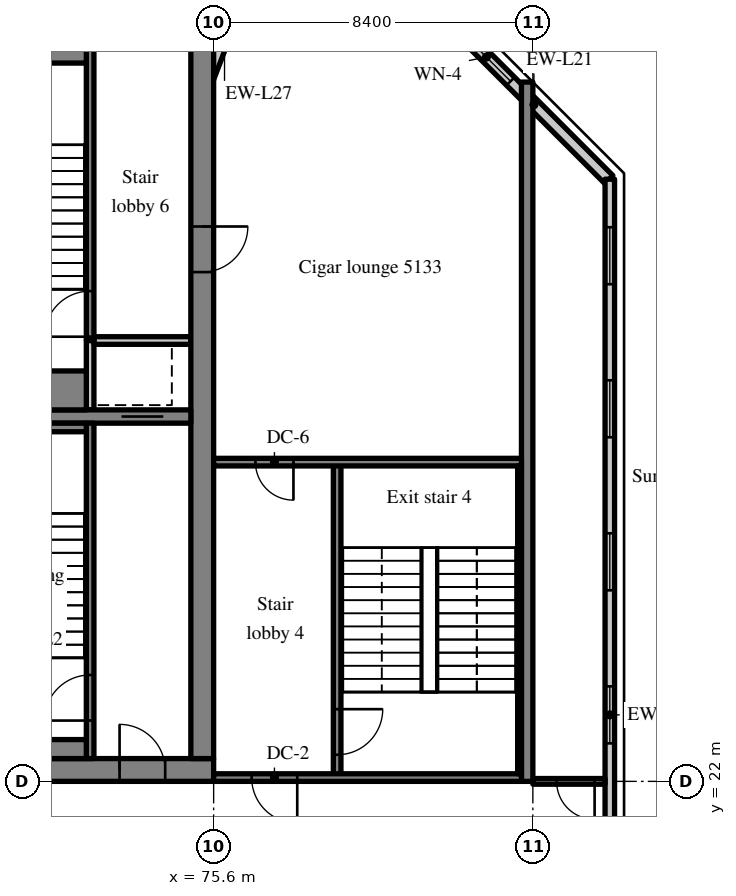
"""IFC4 building model, lengths in metres.
Left out: names, types, materials, properties, quantities, classifications, styles, units other than length and angle.
Written with IfcOpenShell. Run it as: python <this file> out.ifc"""

import sys

from ifc_helpers import new_model, si_unit, direction, frame, frame_2d, origin, place, context, subcontext, project, spatial, rectangle, extrude, source, transform, mapped, element, fill, save


model = new_model("IFC4")
c1 = context("Model", 3, precision=1e-05, world=origin(), true_north=direction((0.0, 1.0)))
c2 = subcontext(c1, "Body", "Model", "MODEL_VIEW")
j1 = project(units=[si_unit("LENGTHUNIT", "METRE"), si_unit("PLANEANGLEUNIT", "RADIAN")], contexts=[c1])
p1 = place(None, origin())
s1 = spatial("IfcSite", under=j1, at=p1, CompositionType="ELEMENT")
p2 = place(p1, origin())
s2 = spatial("IfcBuilding", under=s1, at=p2, CompositionType="ELEMENT")
p3 = place(p2, frame((0.0, 0.0, 214.0)))
s3 = spatial("IfcBuildingStorey", under=s2, at=p3, CompositionType="ELEMENT", Elevation=214.0)
m1 = source(origin(), c2, "Body", "SweptSolid", [
    extrude(rectangle(XDim=50.4, YDim=0.6, at=frame_2d((25.2, 0.0))), origin(), (0.0, 0.0, 1.0), 3.62),
])
p4 = place(p3, frame((25.2, 22.3, 0.0), z_axis=(0.0, 0.0, 1.0), x_axis=(1.0, 0.0, 0.0)))
e1 = element("IfcWall", 1, at=p4, inside=s3, PredefinedType="SHEAR", context=c2, shape_type="MappedRepresentation", body=[
    mapped(m1, transform((0.0, 0.0, 0.0), scale=1.0)),
])
m2 = source(origin(), c2, "Body", "SweptSolid", [
    extrude(rectangle(XDim=1.8, YDim=2.1, at=frame_2d((0.9, 1.05))), frame((0.0, 0.31, 0.0), z_axis=(0.0, -1.0, 0.0), x_axis=(1.0, 0.0, 0.0)), (0.0, 0.0, 1.0), 0.62),
])
p5 = place(p4, frame((15.9, 0.0, 0.0)))
e2 = element("IfcOpeningElement", 2, at=p5, cuts=e1, PredefinedType="OPENING", context=c2, shape_type="MappedRepresentation", body=[
    mapped(m2, transform((0.0, 0.0, 0.0), scale=1.0)),
])
m3 = source(origin(), c2, "Body", "SweptSolid", [
    extrude(rectangle(XDim=0.9, YDim=2.1, at=frame_2d((0.45, 1.05))), frame((0.0, 0.31, 0.0), z_axis=(0.0, -1.0, 0.0), x_axis=(1.0, 0.0, 0.0)), (0.0, 0.0, 1.0), 0.62),
])
p6 = place(p4, frame((9.687, 0.0, 0.0)))
e3 = element("IfcOpeningElement", 3, at=p6, cuts=e1, PredefinedType="OPENING", context=c2, shape_type="MappedRepresentation", body=[
    mapped(m3, transform((0.0, 0.0, 0.0), scale=1.0)),
])
p7 = place(p4, frame((21.513, 0.0, 0.0)))
e4 = element("IfcOpeningElement", 4, at=p7, cuts=e1, PredefinedType="OPENING", context=c2, shape_type="MappedRepresentation", body=[
    mapped(m3, transform((0.0, 0.0, 0.0), scale=1.0)),
])
p8 = place(p4, frame((32.7, 0.0, 0.0)))
e5 = element("IfcOpeningElement", 5, at=p8, cuts=e1, PredefinedType="OPENING", context=c2, shape_type="MappedRepresentation", body=[
    mapped(m2, transform((0.0, 0.0, 0.0), scale=1.0)),
])
m4 = source(origin(), c2, "Body", "SweptSolid", [
    extrude(rectangle(XDim=1.2, YDim=2.1, at=frame_2d((0.6, 1.05))), frame((0.0, 0.31, 0.0), z_axis=(0.0, -1.0, 0.0), x_axis=(1.0, 0.0, 0.0)), (0.0, 0.0, 1.0), 0.62),
])
p9 = place(p4, frame((6.488, 0.0, 0.0)))
e6 = element("IfcOpeningElement", 6, at=p9, cuts=e1, PredefinedType="OPENING", context=c2, shape_type="MappedRepresentation", body=[
    mapped(m4, transform((0.0, 0.0, 0.0), scale=1.0)),
])
p10 = place(p4, frame((47.925, 0.0, 0.0)))
e7 = element("IfcOpeningElement", 7, at=p10, cuts=e1, PredefinedType="OPENING", context=c2, shape_type="MappedRepresentation", body=[
    mapped(m4, transform((0.0, 0.0, 0.0), scale=1.0)),
])
m5 = source(origin(), c2, "Body", "SweptSolid", [
    extrude(rectangle(XDim=18.8, YDim=0.6, at=frame_2d((9.4, 0.0))), origin(), (0.0, 0.0, 1.0), 3.62),
])
p11 = place(p3, frame((75.3, 22.6, 0.0), z_axis=(0.0, 0.0, 1.0), x_axis=(0.0, 1.0, 0.0)))
e8 = element("IfcWall", 8, at=p11, inside=s3, PredefinedType="SHEAR", context=c2, shape_type="MappedRepresentation", body=[
    mapped(m5, transform((0.0, 0.0, 0.0), scale=1.0)),
])
p12 = place(p11, frame((12.8, 0.0, 0.0)))
e9 = element("IfcOpeningElement", 9, at=p12, cuts=e8, PredefinedType="OPENING", context=c2, shape_type="MappedRepresentation", body=[
    mapped(m4, transform((0.0, 0.0, 0.0), scale=1.0)),
])
m6 = source(origin(), c2, "Body", "SweptSolid", [
    extrude(rectangle(XDim=7.625, YDim=0.35, at=frame_2d((3.812, 0.0))), origin(), (0.0, 0.0, 1.0), 3.62),
])
p13 = place(p3, frame((67.375, 31.6, 0.0), z_axis=(0.0, 0.0, 1.0), x_axis=(1.0, 0.0, 0.0)))
e10 = element("IfcWall", 10, at=p13, inside=s3, PredefinedType="SHEAR", context=c2, shape_type="MappedRepresentation", body=[
    mapped(m6, transform((0.0, 0.0, 0.0), scale=1.0)),
])
m7 = source(origin(), c2, "Body", "SweptSolid", [
    extrude(rectangle(XDim=1.1, YDim=2.1, at=frame_2d((0.55, 1.05))), frame((0.0, 0.185, 0.0), z_axis=(0.0, -1.0, 0.0), x_axis=(1.0, 0.0, 0.0)), (0.0, 0.0, 1.0), 0.37),
])
p14 = place(p13, frame((5.8, 0.0, 0.0)))
e11 = element("IfcOpeningElement", 11, at=p14, cuts=e10, PredefinedType="OPENING", context=c2, shape_type="MappedRepresentation", body=[
    mapped(m7, transform((0.0, 0.0, 0.0), scale=1.0)),
])
m8 = source(origin(), c2, "Body", "SweptSolid", [
    extrude(rectangle(XDim=18.4, YDim=0.3, at=frame_2d((9.2, 0.0))), origin(), (0.0, 0.0, 1.0), 3.62),
])
p15 = place(p3, frame((83.85, 22.0, 0.0), z_axis=(0.0, 0.0, 1.0), x_axis=(0.0, 1.0, 0.0)))
e12 = element("IfcWall", 12, at=p15, inside=s3, PredefinedType="SHEAR", context=c2, shape_type="MappedRepresentation", body=[
    mapped(m8, transform((0.0, 0.0, 0.0), scale=1.0)),
])
m9 = source(origin(), c2, "Body", "SweptSolid", [
    extrude(rectangle(XDim=5.576, YDim=0.3, at=frame_2d((2.788, 0.0))), origin(), (0.0, 0.0, 1.0), 3.62),
])
p16 = place(p3, frame((86.0, 37.834, 0.0), z_axis=(0.0, 0.0, 1.0), x_axis=(-0.707106781187, 0.707106781187, 0.0)))
e13 = element("IfcWall", 13, at=p16, inside=s3, PredefinedType="SOLIDWALL", context=c2, shape_type="MappedRepresentation", body=[
    mapped(m9, transform((0.0, 0.0, 0.0), scale=1.0)),
])
m10 = source(origin(), c2, "Body", "SweptSolid", [
    extrude(rectangle(XDim=1.8, YDim=1.5, at=frame_2d((0.9, 0.75))), frame((0.0, 0.16, 0.0), z_axis=(0.0, -1.0, 0.0), x_axis=(1.0, 0.0, 0.0)), (0.0, 0.0, 1.0), 0.32),
])
p17 = place(p16, frame((3.658, 0.0, 0.9)))
e14 = element("IfcOpeningElement", 14, at=p17, cuts=e13, PredefinedType="OPENING", context=c2, shape_type="MappedRepresentation", body=[
    mapped(m10, transform((0.0, 0.0, 0.0), scale=1.0)),
])
m11 = source(origin(), c2, "Body", "SweptSolid", [
    extrude(rectangle(XDim=3.559, YDim=0.3, at=frame_2d((1.78, 0.0))), origin(), (0.0, 0.0, 1.0), 3.62),
])
p18 = place(p3, frame((76.523, 43.292, 0.0), z_axis=(0.0, 0.0, 1.0), x_axis=(-0.35779745313, -0.933799219604, 0.0)))
e15 = element("IfcWall", 15, at=p18, inside=s3, PredefinedType="SOLIDWALL", context=c2, shape_type="MappedRepresentation", body=[
    mapped(m11, transform((0.0, 0.0, 0.0), scale=1.0)),
])
m12 = source(origin(), c2, "Body", "SweptSolid", [
    extrude(rectangle(XDim=1.5, YDim=2.0, at=frame_2d((0.75, 1.0))), frame((0.0, 0.16, 0.0), z_axis=(0.0, -1.0, 0.0), x_axis=(1.0, 0.0, 0.0)), (0.0, 0.0, 1.0), 0.32),
])
p19 = place(p18, frame((0.156, 0.0, 0.9)))
e16 = element("IfcOpeningElement", 16, at=p19, cuts=e15, PredefinedType="OPENING", context=c2, shape_type="MappedRepresentation", body=[
    mapped(m12, transform((0.0, 0.0, 0.0), scale=1.0)),
])
m13 = source(origin(), c2, "Body", "SweptSolid", [
    extrude(rectangle(XDim=28.189, YDim=0.25, at=frame_2d((14.095, 0.0))), origin(), (0.0, 0.0, 1.0), 3.62),
])
p20 = place(p3, frame((86.025, 9.655, 0.0), z_axis=(0.0, 0.0, 1.0), x_axis=(0.0, 1.0, 0.0)))
e17 = element("IfcWall", 17, at=p20, inside=s3, PredefinedType="SOLIDWALL", context=c2, shape_type="MappedRepresentation", body=[
    mapped(m13, transform((0.0, 0.0, 0.0), scale=1.0)),
])
m14 = source(origin(), c2, "Body", "SweptSolid", [
    extrude(rectangle(XDim=1.5, YDim=1.5, at=frame_2d((0.75, 0.75))), frame((0.0, 0.135, 0.0), z_axis=(0.0, -1.0, 0.0), x_axis=(1.0, 0.0, 0.0)), (0.0, 0.0, 1.0), 0.27),
])
p21 = place(p20, frame((1.263, 0.0, 0.9)))
e18 = element("IfcOpeningElement", 18, at=p21, cuts=e17, PredefinedType="OPENING", context=c2, shape_type="MappedRepresentation", body=[
    mapped(m14, transform((0.0, 0.0, 0.0), scale=1.0)),
])
p22 = place(p20, frame((5.291, 0.0, 0.9)))
e19 = element("IfcOpeningElement", 19, at=p22, cuts=e17, PredefinedType="OPENING", context=c2, shape_type="MappedRepresentation", body=[
    mapped(m14, transform((0.0, 0.0, 0.0), scale=1.0)),
])
p23 = place(p20, frame((9.318, 0.0, 0.9)))
e20 = element("IfcOpeningElement", 20, at=p23, cuts=e17, PredefinedType="OPENING", context=c2, shape_type="MappedRepresentation", body=[
    mapped(m14, transform((0.0, 0.0, 0.0), scale=1.0)),
])
p24 = place(p20, frame((13.345, 0.0, 0.9)))
e21 = element("IfcOpeningElement", 21, at=p24, cuts=e17, PredefinedType="OPENING", context=c2, shape_type="MappedRepresentation", body=[
    mapped(m14, transform((0.0, 0.0, 0.0), scale=1.0)),
])
p25 = place(p20, frame((17.372, 0.0, 0.9)))
e22 = element("IfcOpeningElement", 22, at=p25, cuts=e17, PredefinedType="OPENING", context=c2, shape_type="MappedRepresentation", body=[
    mapped(m14, transform((0.0, 0.0, 0.0), scale=1.0)),
])
p26 = place(p20, frame((21.399, 0.0, 0.9)))
e23 = element("IfcOpeningElement", 23, at=p26, cuts=e17, PredefinedType="OPENING", context=c2, shape_type="MappedRepresentation", body=[
    mapped(m14, transform((0.0, 0.0, 0.0), scale=1.0)),
])
p27 = place(p20, frame((25.426, 0.0, 0.9)))
e24 = element("IfcOpeningElement", 24, at=p27, cuts=e17, PredefinedType="OPENING", context=c2, shape_type="MappedRepresentation", body=[
    mapped(m14, transform((0.0, 0.0, 0.0), scale=1.0)),
])
m15 = source(origin(), c2, "Body", "SweptSolid", [
    extrude(rectangle(XDim=8.825, YDim=0.2, at=frame_2d((4.413, 0.0))), origin(), (0.0, 0.0, 1.0), 3.62),
])
p28 = place(p3, frame((72.35, 22.6, 0.0), z_axis=(0.0, 0.0, 1.0), x_axis=(0.0, 1.0, 0.0)))
e25 = element("IfcWall", 25, at=p28, inside=s3, PredefinedType="SOLIDWALL", context=c2, shape_type="MappedRepresentation", body=[
    mapped(m15, transform((0.0, 0.0, 0.0), scale=1.0)),
])
m16 = source(origin(), c2, "Body", "SweptSolid", [
    extrude(rectangle(XDim=1.2, YDim=2.1, at=frame_2d((0.6, 1.05))), frame((0.0, 0.11, 0.0), z_axis=(0.0, -1.0, 0.0), x_axis=(1.0, 0.0, 0.0)), (0.0, 0.0, 1.0), 0.22),
])
p29 = place(p28, frame((1.0, 0.0, 0.0)))
e26 = element("IfcOpeningElement", 26, at=p29, cuts=e25, PredefinedType="OPENING", context=c2, shape_type="MappedRepresentation", body=[
    mapped(m16, transform((0.0, 0.0, 0.0), scale=1.0)),
])
m17 = source(origin(), c2, "Body", "SweptSolid", [
    extrude(rectangle(XDim=1.825, YDim=0.2, at=frame_2d((0.913, 0.0))), origin(), (0.0, 0.0, 1.0), 3.62),
])
p30 = place(p3, frame((72.35, 31.775, 0.0), z_axis=(0.0, 0.0, 1.0), x_axis=(0.0, 1.0, 0.0)))
e27 = element("IfcWall", 27, at=p30, inside=s3, PredefinedType="SOLIDWALL", context=c2, shape_type="MappedRepresentation", body=[
    mapped(m17, transform((0.0, 0.0, 0.0), scale=1.0)),
])
m18 = source(origin(), c2, "Body", "SweptSolid", [
    extrude(rectangle(XDim=2.55, YDim=0.2, at=frame_2d((1.275, 0.0))), origin(), (0.0, 0.0, 1.0), 3.62),
])
p31 = place(p3, frame((72.45, 33.6, 0.0), z_axis=(0.0, 0.0, 1.0), x_axis=(1.0, 0.0, 0.0)))
e28 = element("IfcWall", 28, at=p31, inside=s3, PredefinedType="SOLIDWALL", context=c2, shape_type="MappedRepresentation", body=[
    mapped(m18, transform((0.0, 0.0, 0.0), scale=1.0)),
])
m19 = source(origin(), c2, "Body", "SweptSolid", [
    extrude(rectangle(XDim=7.8, YDim=0.2, at=frame_2d((3.9, 0.0))), origin(), (0.0, 0.0, 1.0), 3.62),
])
p32 = place(p3, frame((72.35, 33.6, 0.0), z_axis=(0.0, 0.0, 1.0), x_axis=(0.0, 1.0, 0.0)))
e29 = element("IfcWall", 29, at=p32, inside=s3, PredefinedType="SOLIDWALL", context=c2, shape_type="MappedRepresentation", body=[
    mapped(m19, transform((0.0, 0.0, 0.0), scale=1.0)),
])
p33 = place(p32, frame((0.1, 0.0, 0.0)))
e30 = element("IfcOpeningElement", 30, at=p33, cuts=e29, PredefinedType="OPENING", context=c2, shape_type="MappedRepresentation", body=[
    mapped(m16, transform((0.0, 0.0, 0.0), scale=1.0)),
])
m20 = source(origin(), c2, "Body", "SweptSolid", [
    extrude(rectangle(XDim=8.3, YDim=0.2, at=frame_2d((4.15, 0.0))), origin(), (0.0, 0.0, 1.0), 3.62),
])
p34 = place(p3, frame((78.85, 22.1, 0.0), z_axis=(0.0, 0.0, 1.0), x_axis=(0.0, 1.0, 0.0)))
e31 = element("IfcWall", 31, at=p34, inside=s3, PredefinedType="SOLIDWALL", context=c2, shape_type="MappedRepresentation", body=[
    mapped(m20, transform((0.0, 0.0, 0.0), scale=1.0)),
])
p35 = place(p34, frame((0.6, 0.0, 0.0)))
e32 = element("IfcOpeningElement", 32, at=p35, cuts=e31, PredefinedType="OPENING", context=c2, shape_type="MappedRepresentation", body=[
    mapped(m16, transform((0.0, 0.0, 0.0), scale=1.0)),
])
m21 = source(origin(), c2, "Body", "SweptSolid", [
    extrude(rectangle(XDim=8.1, YDim=0.2, at=frame_2d((4.05, 0.0))), origin(), (0.0, 0.0, 1.0), 3.62),
])
p36 = place(p3, frame((83.7, 22.1, 0.0), z_axis=(0.0, 0.0, 1.0), x_axis=(-1.0, 0.0, 0.0)))
e33 = element("IfcWall", 33, at=p36, inside=s3, PredefinedType="SOLIDWALL", context=c2, shape_type="MappedRepresentation", body=[
    mapped(m21, transform((0.0, 0.0, 0.0), scale=1.0)),
])
p37 = place(p36, frame((5.9, 0.0, 0.0)))
e34 = element("IfcOpeningElement", 34, at=p37, cuts=e33, PredefinedType="OPENING", context=c2, shape_type="MappedRepresentation", body=[
    mapped(m16, transform((0.0, 0.0, 0.0), scale=1.0)),
])
p38 = place(p3, frame((83.7, 30.4, 0.0), z_axis=(0.0, 0.0, 1.0), x_axis=(-1.0, 0.0, 0.0)))
e35 = element("IfcWall", 35, at=p38, inside=s3, PredefinedType="SOLIDWALL", context=c2, shape_type="MappedRepresentation", body=[
    mapped(m21, transform((0.0, 0.0, 0.0), scale=1.0)),
])
m22 = source(origin(), c2, "Body", "SweptSolid", [
    extrude(rectangle(XDim=1.0, YDim=2.1, at=frame_2d((0.5, 1.05))), frame((0.0, 0.11, 0.0), z_axis=(0.0, -1.0, 0.0), x_axis=(1.0, 0.0, 0.0)), (0.0, 0.0, 1.0), 0.22),
])
p39 = place(p38, frame((6.0, 0.0, 0.0)))
e36 = element("IfcOpeningElement", 36, at=p39, cuts=e35, PredefinedType="OPENING", context=c2, shape_type="MappedRepresentation", body=[
    mapped(m22, transform((0.0, 0.0, 0.0), scale=1.0)),
])
m23 = source(origin(), c2, "Body", "SweptSolid", [
    extrude(rectangle(XDim=4.875, YDim=0.5, at=frame_2d((2.438, 0.0))), origin(), (0.0, 0.0, 1.0), 3.62),
])
p40 = place(p3, frame((67.375, 22.85, 0.0), z_axis=(0.0, 0.0, 1.0), x_axis=(1.0, 0.0, 0.0)))
e37 = element("IfcWall", 37, at=p40, inside=s3, PredefinedType="SOLIDWALL", context=c2, shape_type="MappedRepresentation", body=[
    mapped(m23, transform((0.0, 0.0, 0.0), scale=1.0)),
])
m24 = source(origin(), c2, "Body", "SweptSolid", [
    extrude(rectangle(XDim=4.875, YDim=0.225, at=frame_2d((2.438, 0.0))), origin(), (0.0, 0.0, 1.0), 3.62),
])
p41 = place(p3, frame((67.375, 31.312, 0.0), z_axis=(0.0, 0.0, 1.0), x_axis=(1.0, 0.0, 0.0)))
e38 = element("IfcWall", 38, at=p41, inside=s3, PredefinedType="SOLIDWALL", context=c2, shape_type="MappedRepresentation", body=[
    mapped(m24, transform((0.0, 0.0, 0.0), scale=1.0)),
])
p42 = place(p3, frame((67.375, 41.15, 0.0), z_axis=(0.0, 0.0, 1.0), x_axis=(1.0, 0.0, 0.0)))
e39 = element("IfcWall", 39, at=p42, inside=s3, PredefinedType="SOLIDWALL", context=c2, shape_type="MappedRepresentation", body=[
    mapped(m23, transform((0.0, 0.0, 0.0), scale=1.0)),
])
m25 = source(origin(), c2, "Body", "SweptSolid", [
    extrude(rectangle(XDim=4.875, YDim=1.025, at=frame_2d((2.438, 0.0))), origin(), (0.0, 0.0, 1.0), 3.62),
])
p43 = place(p3, frame((67.375, 32.287, 0.0), z_axis=(0.0, 0.0, 1.0), x_axis=(1.0, 0.0, 0.0)))
e40 = element("IfcWall", 40, at=p43, inside=s3, PredefinedType="SOLIDWALL", context=c2, shape_type="MappedRepresentation", body=[
    mapped(m25, transform((0.0, 0.0, 0.0), scale=1.0)),
])
m26 = source(origin(), c2, "Body", "SweptSolid", [
    extrude(rectangle(XDim=8.1, YDim=0.1, at=frame_2d((4.05, 0.0))), origin(), (0.0, 0.0, 1.0), 3.62),
])
p44 = place(p3, frame((83.65, 22.2, 0.0), z_axis=(0.0, 0.0, 1.0), x_axis=(0.0, 1.0, 0.0)))
e41 = element("IfcWall", 41, at=p44, inside=s3, PredefinedType="SOLIDWALL", context=c2, shape_type="MappedRepresentation", body=[
    mapped(m26, transform((0.0, 0.0, 0.0), scale=1.0)),
])
m27 = source(origin(), c2, "Body", "SweptSolid", [
    extrude(rectangle(XDim=1.9, YDim=0.15, at=frame_2d((0.95, 0.0))), origin(), (0.0, 0.0, 1.0), 2.92),
])
p45 = place(p3, frame((84.0, 22.0, 0.0), z_axis=(0.0, 0.0, 1.0), x_axis=(1.0, 0.0, 0.0)))
e42 = element("IfcWall", 42, at=p45, inside=s3, PredefinedType="PARTITIONING", context=c2, shape_type="MappedRepresentation", body=[
    mapped(m27, transform((0.0, 0.0, 0.0), scale=1.0)),
])
m28 = source(origin(), c2, "Body", "SweptSolid", [
    extrude(rectangle(XDim=1.0, YDim=2.1, at=frame_2d((0.5, 1.05))), frame((0.0, 0.085, 0.0), z_axis=(0.0, -1.0, 0.0), x_axis=(1.0, 0.0, 0.0)), (0.0, 0.0, 1.0), 0.17),
])
p46 = place(p45, frame((0.625, 0.0, 0.0)))
e43 = element("IfcOpeningElement", 43, at=p46, cuts=e42, PredefinedType="OPENING", context=c2, shape_type="MappedRepresentation", body=[
    mapped(m28, transform((0.0, 0.0, 0.0), scale=1.0)),
])
m29 = source(origin(), c2, "Body", "SweptSolid", [
    extrude(rectangle(XDim=1.8, YDim=1.5, at=frame_2d((0.9, 0.75))), frame((0.0, 0.03, 0.0), z_axis=(0.0, -1.0, 0.0), x_axis=(1.0, 0.0, 0.0)), (0.0, 0.0, 1.0), 0.06),
])
p47 = place(p17, origin())
e44 = element("IfcWindow", 44, at=p47, inside=s3, PartitioningType="SINGLE_PANEL", PredefinedType="WINDOW", context=c2, shape_type="MappedRepresentation", body=[
    mapped(m29, transform((0.0, 0.0, 0.0), scale=1.0)),
])
fill(e14, e44)
m30 = source(origin(), c2, "Body", "SweptSolid", [
    extrude(rectangle(XDim=1.5, YDim=1.5, at=frame_2d((0.75, 0.75))), frame((0.0, 0.03, 0.0), z_axis=(0.0, -1.0, 0.0), x_axis=(1.0, 0.0, 0.0)), (0.0, 0.0, 1.0), 0.06),
])
p48 = place(p24, origin())
e45 = element("IfcWindow", 45, at=p48, inside=s3, PartitioningType="SINGLE_PANEL", PredefinedType="WINDOW", context=c2, shape_type="MappedRepresentation", body=[
    mapped(m30, transform((0.0, 0.0, 0.0), scale=1.0)),
])
fill(e21, e45)
p49 = place(p25, origin())
e46 = element("IfcWindow", 46, at=p49, inside=s3, PartitioningType="SINGLE_PANEL", PredefinedType="WINDOW", context=c2, shape_type="MappedRepresentation", body=[
    mapped(m30, transform((0.0, 0.0, 0.0), scale=1.0)),
])
fill(e22, e46)
p50 = place(p26, origin())
e47 = element("IfcWindow", 47, at=p50, inside=s3, PartitioningType="SINGLE_PANEL", PredefinedType="WINDOW", context=c2, shape_type="MappedRepresentation", body=[
    mapped(m30, transform((0.0, 0.0, 0.0), scale=1.0)),
])
fill(e23, e47)
p51 = place(p27, origin())
e48 = element("IfcWindow", 48, at=p51, inside=s3, PartitioningType="SINGLE_PANEL", PredefinedType="WINDOW", context=c2, shape_type="MappedRepresentation", body=[
    mapped(m30, transform((0.0, 0.0, 0.0), scale=1.0)),
])
fill(e24, e48)
m31 = source(origin(), c2, "Body", "SweptSolid", [
    extrude(rectangle(XDim=1.2, YDim=2.1, at=frame_2d((0.6, 1.05))), frame((0.0, 0.025, 0.0), z_axis=(0.0, -1.0, 0.0), x_axis=(1.0, 0.0, 0.0)), (0.0, 0.0, 1.0), 0.05),
])
p52 = place(p29, origin())
e49 = element("IfcDoor", 49, at=p52, inside=s3, OperationType="SINGLE_SWING_LEFT", PredefinedType="DOOR", context=c2, shape_type="MappedRepresentation", body=[
    mapped(m31, transform((0.0, 0.0, 0.0), scale=1.0)),
])
fill(e26, e49)
m32 = source(origin(), c2, "Body", "SweptSolid", [
    extrude(rectangle(XDim=1.2, YDim=2.1, at=frame_2d((0.6, 1.05))), frame((0.0, 0.225, 0.0), z_axis=(0.0, -1.0, 0.0), x_axis=(1.0, 0.0, 0.0)), (0.0, 0.0, 1.0), 0.05),
])
p53 = place(p10, origin())
e50 = element("IfcDoor", 50, at=p53, inside=s3, OperationType="SINGLE_SWING_LEFT", PredefinedType="DOOR", context=c2, shape_type="MappedRepresentation", body=[
    mapped(m32, transform((0.0, 0.0, 0.0), scale=1.0)),
])
fill(e7, e50)
m33 = source(origin(), c2, "Body", "SweptSolid", [
    extrude(rectangle(XDim=1.1, YDim=2.1, at=frame_2d((0.55, 1.05))), frame((0.0, 0.025, 0.0), z_axis=(0.0, -1.0, 0.0), x_axis=(1.0, 0.0, 0.0)), (0.0, 0.0, 1.0), 0.05),
])
p54 = place(p14, origin())
e51 = element("IfcDoor", 51, at=p54, inside=s3, OperationType="SLIDING_TO_LEFT", PredefinedType="DOOR", context=c2, shape_type="MappedRepresentation", body=[
    mapped(m33, transform((0.0, 0.0, 0.0), scale=1.0)),
])
fill(e11, e51)
p55 = place(p33, origin())
e52 = element("IfcDoor", 52, at=p55, inside=s3, OperationType="SINGLE_SWING_LEFT", PredefinedType="DOOR", context=c2, shape_type="MappedRepresentation", body=[
    mapped(m31, transform((0.0, 0.0, 0.0), scale=1.0)),
])
fill(e30, e52)
p56 = place(p12, origin())
e53 = element("IfcDoor", 53, at=p56, inside=s3, OperationType="SINGLE_SWING_RIGHT", PredefinedType="DOOR", context=c2, shape_type="MappedRepresentation", body=[
    mapped(m31, transform((0.0, 0.0, 0.0), scale=1.0)),
])
fill(e9, e53)
p57 = place(p35, origin())
e54 = element("IfcDoor", 54, at=p57, inside=s3, OperationType="SINGLE_SWING_RIGHT", PredefinedType="DOOR", context=c2, shape_type="MappedRepresentation", body=[
    mapped(m31, transform((0.0, 0.0, 0.0), scale=1.0)),
])
fill(e32, e54)
p58 = place(p37, origin())
e55 = element("IfcDoor", 55, at=p58, inside=s3, OperationType="SINGLE_SWING_LEFT", PredefinedType="DOOR", context=c2, shape_type="MappedRepresentation", body=[
    mapped(m31, transform((0.0, 0.0, 0.0), scale=1.0)),
])
fill(e34, e55)
m34 = source(origin(), c2, "Body", "SweptSolid", [
    extrude(rectangle(XDim=1.0, YDim=2.1, at=frame_2d((0.5, 1.05))), frame((0.0, 0.025, 0.0), z_axis=(0.0, -1.0, 0.0), x_axis=(1.0, 0.0, 0.0)), (0.0, 0.0, 1.0), 0.05),
])
p59 = place(p39, origin())
e56 = element("IfcDoor", 56, at=p59, inside=s3, OperationType="SINGLE_SWING_LEFT", PredefinedType="DOOR", context=c2, shape_type="MappedRepresentation", body=[
    mapped(m34, transform((0.0, 0.0, 0.0), scale=1.0)),
])
fill(e36, e56)
p60 = place(p46, origin())
e57 = element("IfcDoor", 57, at=p60, inside=s3, OperationType="SINGLE_SWING_RIGHT", PredefinedType="DOOR", context=c2, shape_type="MappedRepresentation", body=[
    mapped(m34, transform((0.0, 0.0, 0.0), scale=1.0)),
])
fill(e43, e57)
save(model, sys.argv[1])
